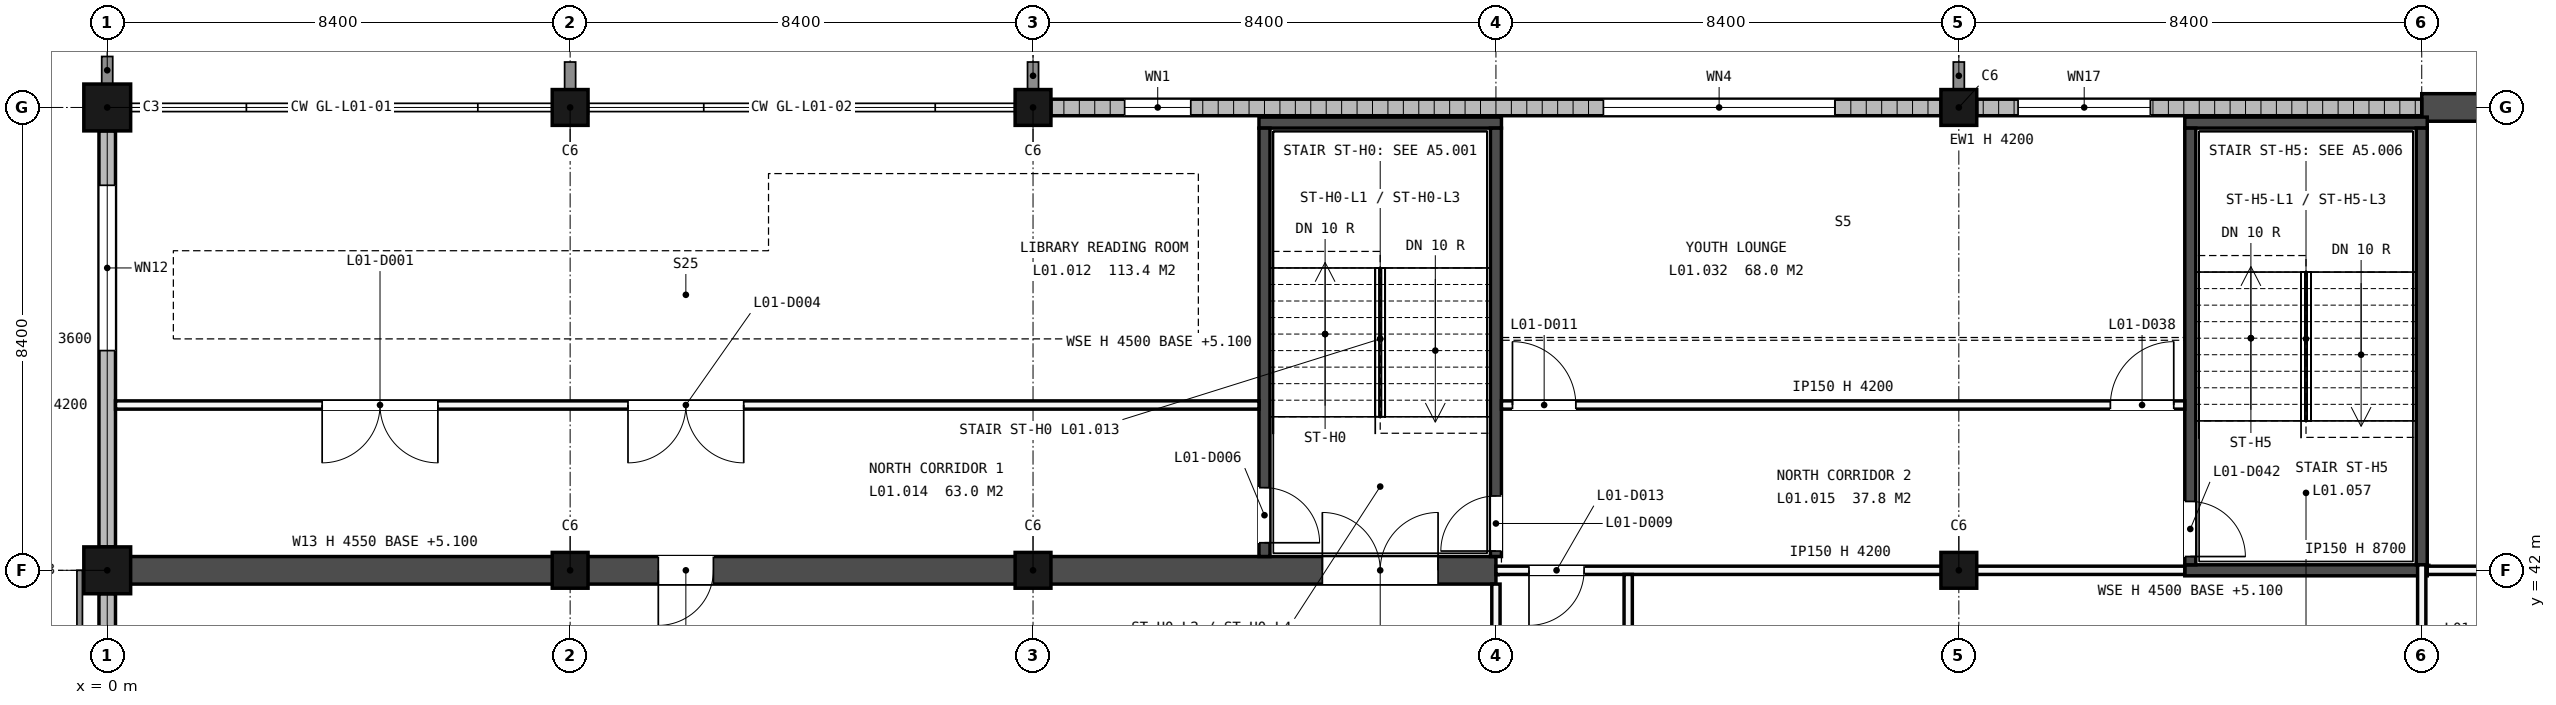
"""IFC4 building model, lengths in metres.
Left out: names, types, materials, properties, quantities, classifications, styles, units other than length and angle.
Written with IfcOpenShell. Run it as: python <this file> out.ifc"""

import sys

from ifc_helpers import new_model, si_unit, direction, frame, frame_2d, origin, origin_2d, place, context, subcontext, project, spatial, rectangle, extrude, element, fill, save


model = new_model("IFC4")
c1 = context("Model", 3, precision=1e-05, world=origin(), true_north=direction((0.0, 1.0)))
c2 = subcontext(c1, "Body", "Model", "MODEL_VIEW")
j1 = project(units=[si_unit("LENGTHUNIT", "METRE"), si_unit("PLANEANGLEUNIT", "RADIAN")], contexts=[c1])
p1 = place(None, origin())
s1 = spatial("IfcSite", under=j1, at=p1, CompositionType="ELEMENT")
p2 = place(p1, origin())
s2 = spatial("IfcBuilding", under=s1, at=p2, CompositionType="ELEMENT")
p3 = place(p2, frame((0.0, 0.0, 5.4)))
s3 = spatial("IfcBuildingStorey", under=s2, at=p3, CompositionType="ELEMENT", Elevation=5.4)
for number, where, z_axis, x_axis in (
    (1, (0.0, 42.0, -0.3), (0.0, 0.0, 1.0), (1.0, 0.0, 0.0)),
    (2, (0.0, 50.4, -0.3), (0.0, 0.0, 1.0), (1.0, 0.0, 0.0)),
):
    element("IfcColumn", number, at=place(p3, frame(where, z_axis=z_axis, x_axis=x_axis)), inside=s3, PredefinedType="COLUMN", context=c2, shape_type="SweptSolid", body=[
        extrude(rectangle(XDim=0.85, YDim=0.85, at=origin_2d()), origin(), (0.0, 0.0, 1.0), 4.55),
    ])
for number, where, z_axis, x_axis in (
    (3, (8.4, 42.0, -0.3), (0.0, 0.0, 1.0), (1.0, 0.0, 0.0)),
    (4, (8.4, 50.4, -0.3), (0.0, 0.0, 1.0), (1.0, 0.0, 0.0)),
    (5, (16.8, 42.0, -0.3), (0.0, 0.0, 1.0), (1.0, 0.0, 0.0)),
    (6, (16.8, 50.4, -0.3), (0.0, 0.0, 1.0), (1.0, 0.0, 0.0)),
    (7, (33.6, 42.0, -0.3), (0.0, 0.0, 1.0), (1.0, 0.0, 0.0)),
    (8, (33.6, 50.4, -0.3), (0.0, 0.0, 1.0), (1.0, 0.0, 0.0)),
):
    element("IfcColumn", number, at=place(p3, frame(where, z_axis=z_axis, x_axis=x_axis)), inside=s3, PredefinedType="COLUMN", context=c2, shape_type="SweptSolid", body=[
        extrude(rectangle(XDim=0.65, YDim=0.65, at=origin_2d()), origin(), (0.0, 0.0, 1.0), 4.55),
    ])
p4 = place(p3, frame((42.0, 50.4, -0.3), z_axis=(0.0, 0.0, 1.0), x_axis=(1.0, 0.0, 0.0)))
e9 = element("IfcWall", 9, at=p4, inside=s3, PredefinedType="SHEAR", context=c2, shape_type="SweptSolid", body=[
    extrude(rectangle(XDim=42.0, YDim=0.5, at=frame_2d((21.0, 0.0))), origin(), (0.0, 0.0, 1.0), 4.55),
])
p5 = place(p3, frame((0.0, 42.0, -0.3), z_axis=(0.0, 0.0, 1.0), x_axis=(1.0, 0.0, 0.0)))
e10 = element("IfcWall", 10, at=p5, inside=s3, PredefinedType="SHEAR", context=c2, shape_type="SweptSolid", body=[
    extrude(rectangle(XDim=25.2, YDim=0.5, at=frame_2d((12.6, 0.0))), origin(), (0.0, 0.0, 1.0), 4.55),
])
p6 = place(p5, frame((22.05, 0.0, 0.3)))
e11 = element("IfcOpeningElement", 11, at=p6, cuts=e10, PredefinedType="OPENING", context=c2, shape_type="SweptSolid", body=[
    extrude(rectangle(XDim=2.1, YDim=2.1, at=frame_2d((1.05, 1.05))), frame((0.0, 0.26, 0.0), z_axis=(0.0, -1.0, 0.0), x_axis=(1.0, 0.0, 0.0)), (0.0, 0.0, 1.0), 0.52),
])
p7 = place(p5, frame((10.0, 0.0, 0.3)))
e12 = element("IfcOpeningElement", 12, at=p7, cuts=e10, PredefinedType="OPENING", context=c2, shape_type="SweptSolid", body=[
    extrude(rectangle(XDim=1.0, YDim=2.1, at=frame_2d((0.5, 1.05))), frame((0.0, 0.26, 0.0), z_axis=(0.0, -1.0, 0.0), x_axis=(1.0, 0.0, 0.0)), (0.0, 0.0, 1.0), 0.52),
])
p8 = place(p3, frame((17.125, 50.4, 0.0), z_axis=(0.0, 0.0, 1.0), x_axis=(1.0, 0.0, 0.0)))
e13 = element("IfcWall", 13, at=p8, inside=s3, PredefinedType="STANDARD", context=c2, shape_type="SweptSolid", body=[
    extrude(rectangle(XDim=16.15, YDim=0.3, at=frame_2d((8.075, 0.0))), origin(), (0.0, 0.0, 1.0), 4.2),
])
p9 = place(p8, frame((1.337, 0.0, 0.9)))
e14 = element("IfcOpeningElement", 14, at=p9, cuts=e13, PredefinedType="OPENING", context=c2, shape_type="SweptSolid", body=[
    extrude(rectangle(XDim=1.2, YDim=1.5, at=frame_2d((0.6, 0.75))), frame((0.0, 0.16, 0.0), z_axis=(0.0, -1.0, 0.0), x_axis=(1.0, 0.0, 0.0)), (0.0, 0.0, 1.0), 0.32),
])
p10 = place(p8, frame((10.025, 0.0, 0.9)))
e15 = element("IfcOpeningElement", 15, at=p10, cuts=e13, PredefinedType="OPENING", context=c2, shape_type="SweptSolid", body=[
    extrude(rectangle(XDim=4.2, YDim=1.5, at=frame_2d((2.1, 0.75))), frame((0.0, 0.16, 0.0), z_axis=(0.0, -1.0, 0.0), x_axis=(1.0, 0.0, 0.0)), (0.0, 0.0, 1.0), 0.32),
])
p11 = place(p3, frame((33.925, 50.4, 0.0), z_axis=(0.0, 0.0, 1.0), x_axis=(1.0, 0.0, 0.0)))
e16 = element("IfcWall", 16, at=p11, inside=s3, PredefinedType="STANDARD", context=c2, shape_type="SweptSolid", body=[
    extrude(rectangle(XDim=8.075, YDim=0.3, at=frame_2d((4.038, 0.0))), origin(), (0.0, 0.0, 1.0), 4.2),
])
p12 = place(p11, frame((0.75, 0.0, 0.9)))
e17 = element("IfcOpeningElement", 17, at=p12, cuts=e16, PredefinedType="OPENING", context=c2, shape_type="SweptSolid", body=[
    extrude(rectangle(XDim=2.4, YDim=1.5, at=frame_2d((1.2, 0.75))), frame((0.0, 0.16, 0.0), z_axis=(0.0, -1.0, 0.0), x_axis=(1.0, 0.0, 0.0)), (0.0, 0.0, 1.0), 0.32),
])
p13 = place(p3, frame((0.0, 8.825, 0.0), z_axis=(0.0, 0.0, 1.0), x_axis=(0.0, 1.0, 0.0)))
e18 = element("IfcWall", 18, at=p13, inside=s3, PredefinedType="STANDARD", context=c2, shape_type="SweptSolid", body=[
    extrude(rectangle(XDim=32.75, YDim=0.3, at=frame_2d((16.375, 0.0))), origin(), (0.0, 0.0, 1.0), 3.4),
])
p14 = place(p13, frame((29.663, 0.0, 0.9)))
e19 = element("IfcOpeningElement", 19, at=p14, cuts=e18, PredefinedType="OPENING", context=c2, shape_type="SweptSolid", body=[
    extrude(rectangle(XDim=2.4, YDim=1.5, at=frame_2d((1.2, 0.75))), frame((0.0, 0.16, 0.0), z_axis=(0.0, -1.0, 0.0), x_axis=(1.0, 0.0, 0.0)), (0.0, 0.0, 1.0), 0.32),
])
p15 = place(p3, frame((0.0, 42.425, 0.0), z_axis=(0.0, 0.0, 1.0), x_axis=(0.0, 1.0, 0.0)))
e20 = element("IfcWall", 20, at=p15, inside=s3, PredefinedType="STANDARD", context=c2, shape_type="SweptSolid", body=[
    extrude(rectangle(XDim=7.55, YDim=0.3, at=frame_2d((3.775, 0.0))), origin(), (0.0, 0.0, 1.0), 3.6),
])
p16 = place(p15, frame((3.562, 0.0, 2.4)))
e21 = element("IfcOpeningElement", 21, at=p16, cuts=e20, PredefinedType="OPENING", context=c2, shape_type="SweptSolid", body=[
    extrude(rectangle(XDim=3.0, YDim=0.9, at=frame_2d((1.5, 0.45))), frame((0.0, 0.16, 0.0), z_axis=(0.0, -1.0, 0.0), x_axis=(1.0, 0.0, 0.0)), (0.0, 0.0, 1.0), 0.32),
])
p17 = place(p3, frame((20.9, 50.125, -0.3), z_axis=(0.0, 0.0, 1.0), x_axis=(1.0, 0.0, 0.0)))
e22 = element("IfcWall", 22, at=p17, inside=s3, PredefinedType="SHEAR", context=c2, shape_type="SweptSolid", body=[
    extrude(rectangle(XDim=4.4, YDim=0.2, at=frame_2d((2.2, 0.0))), origin(), (0.0, 0.0, 1.0), 4.5),
])
p18 = place(p3, frame((21.0, 42.25, -0.3), z_axis=(0.0, 0.0, 1.0), x_axis=(0.0, 1.0, 0.0)))
e23 = element("IfcWall", 23, at=p18, inside=s3, PredefinedType="SHEAR", context=c2, shape_type="SweptSolid", body=[
    extrude(rectangle(XDim=7.775, YDim=0.2, at=frame_2d((3.887, 0.0))), origin(), (0.0, 0.0, 1.0), 4.5),
])
p19 = place(p18, frame((0.25, 0.0, 0.3)))
e24 = element("IfcOpeningElement", 24, at=p19, cuts=e23, PredefinedType="OPENING", context=c2, shape_type="SweptSolid", body=[
    extrude(rectangle(XDim=1.0, YDim=2.1, at=frame_2d((0.5, 1.05))), frame((0.0, 0.11, 0.0), z_axis=(0.0, -1.0, 0.0), x_axis=(1.0, 0.0, 0.0)), (0.0, 0.0, 1.0), 0.22),
])
p20 = place(p3, frame((25.2, 42.25, -0.3), z_axis=(0.0, 0.0, 1.0), x_axis=(0.0, 1.0, 0.0)))
e25 = element("IfcWall", 25, at=p20, inside=s3, PredefinedType="SHEAR", context=c2, shape_type="SweptSolid", body=[
    extrude(rectangle(XDim=7.775, YDim=0.2, at=frame_2d((3.887, 0.0))), origin(), (0.0, 0.0, 1.0), 4.5),
])
p21 = place(p20, frame((0.1, 0.0, 0.3)))
e26 = element("IfcOpeningElement", 26, at=p21, cuts=e25, PredefinedType="OPENING", context=c2, shape_type="SweptSolid", body=[
    extrude(rectangle(XDim=1.0, YDim=2.1, at=frame_2d((0.5, 1.05))), frame((0.0, 0.11, 0.0), z_axis=(0.0, -1.0, 0.0), x_axis=(1.0, 0.0, 0.0)), (0.0, 0.0, 1.0), 0.22),
])
for number, where, z_axis, x_axis in (
    (27, (37.7, 42.0, -0.3), (0.0, 0.0, 1.0), (1.0, 0.0, 0.0)),
    (28, (37.7, 50.125, -0.3), (0.0, 0.0, 1.0), (1.0, 0.0, 0.0)),
):
    element("IfcWall", number, at=place(p3, frame(where, z_axis=z_axis, x_axis=x_axis)), inside=s3, PredefinedType="SHEAR", context=c2, shape_type="SweptSolid", body=[
        extrude(rectangle(XDim=4.4, YDim=0.2, at=frame_2d((2.2, 0.0))), origin(), (0.0, 0.0, 1.0), 4.5),
    ])
p22 = place(p3, frame((37.8, 42.1, -0.3), z_axis=(0.0, 0.0, 1.0), x_axis=(0.0, 1.0, 0.0)))
e29 = element("IfcWall", 29, at=p22, inside=s3, PredefinedType="SHEAR", context=c2, shape_type="SweptSolid", body=[
    extrude(rectangle(XDim=7.925, YDim=0.2, at=frame_2d((3.962, 0.0))), origin(), (0.0, 0.0, 1.0), 4.5),
])
p23 = place(p22, frame((0.15, 0.0, 0.3)))
e30 = element("IfcOpeningElement", 30, at=p23, cuts=e29, PredefinedType="OPENING", context=c2, shape_type="SweptSolid", body=[
    extrude(rectangle(XDim=1.0, YDim=2.1, at=frame_2d((0.5, 1.05))), frame((0.0, 0.11, 0.0), z_axis=(0.0, -1.0, 0.0), x_axis=(1.0, 0.0, 0.0)), (0.0, 0.0, 1.0), 0.22),
])
p24 = place(p3, frame((42.0, 42.1, -0.3), z_axis=(0.0, 0.0, 1.0), x_axis=(0.0, 1.0, 0.0)))
e31 = element("IfcWall", 31, at=p24, inside=s3, PredefinedType="SHEAR", context=c2, shape_type="SweptSolid", body=[
    extrude(rectangle(XDim=7.925, YDim=0.2, at=frame_2d((3.962, 0.0))), origin(), (0.0, 0.0, 1.0), 4.5),
])
p25 = place(p3, frame((42.1, 42.0, -0.3), z_axis=(0.0, 0.0, 1.0), x_axis=(1.0, 0.0, 0.0)))
e32 = element("IfcWall", 32, at=p25, inside=s3, PredefinedType="PARTITIONING", context=c2, shape_type="SweptSolid", body=[
    extrude(rectangle(XDim=41.9, YDim=0.15, at=frame_2d((20.95, 0.0))), origin(), (0.0, 0.0, 1.0), 4.5),
])
p26 = place(p3, frame((25.2, 42.0, 0.0), z_axis=(0.0, 0.0, 1.0), x_axis=(1.0, 0.0, 0.0)))
e33 = element("IfcWall", 33, at=p26, inside=s3, PredefinedType="PARTITIONING", context=c2, shape_type="SweptSolid", body=[
    extrude(rectangle(XDim=12.5, YDim=0.15, at=frame_2d((6.25, 0.0))), origin(), (0.0, 0.0, 1.0), 4.2),
])
p27 = place(p26, frame((0.6, 0.0, 0.0)))
e34 = element("IfcOpeningElement", 34, at=p27, cuts=e33, PredefinedType="OPENING", context=c2, shape_type="SweptSolid", body=[
    extrude(rectangle(XDim=1.0, YDim=2.1, at=frame_2d((0.5, 1.05))), frame((0.0, 0.085, 0.0), z_axis=(0.0, -1.0, 0.0), x_axis=(1.0, 0.0, 0.0)), (0.0, 0.0, 1.0), 0.17),
])
p28 = place(p3, frame((0.15, 45.0, 0.0), z_axis=(0.0, 0.0, 1.0), x_axis=(1.0, 0.0, 0.0)))
e35 = element("IfcWall", 35, at=p28, inside=s3, PredefinedType="PARTITIONING", context=c2, shape_type="SweptSolid", body=[
    extrude(rectangle(XDim=20.75, YDim=0.15, at=frame_2d((10.375, 0.0))), origin(), (0.0, 0.0, 1.0), 4.2),
])
p29 = place(p28, frame((9.3, 0.0, 0.0)))
e36 = element("IfcOpeningElement", 36, at=p29, cuts=e35, PredefinedType="OPENING", context=c2, shape_type="SweptSolid", body=[
    extrude(rectangle(XDim=2.1, YDim=2.25, at=frame_2d((1.05, 1.125))), frame((0.0, 0.085, 0.0), z_axis=(0.0, -1.0, 0.0), x_axis=(1.0, 0.0, 0.0)), (0.0, 0.0, 1.0), 0.17),
])
p30 = place(p28, frame((3.75, 0.0, 0.0)))
e37 = element("IfcOpeningElement", 37, at=p30, cuts=e35, PredefinedType="OPENING", context=c2, shape_type="SweptSolid", body=[
    extrude(rectangle(XDim=2.1, YDim=2.25, at=frame_2d((1.05, 1.125))), frame((0.0, 0.085, 0.0), z_axis=(0.0, -1.0, 0.0), x_axis=(1.0, 0.0, 0.0)), (0.0, 0.0, 1.0), 0.17),
])
p31 = place(p3, frame((25.3, 45.0, 0.0), z_axis=(0.0, 0.0, 1.0), x_axis=(1.0, 0.0, 0.0)))
e38 = element("IfcWall", 38, at=p31, inside=s3, PredefinedType="PARTITIONING", context=c2, shape_type="SweptSolid", body=[
    extrude(rectangle(XDim=12.4, YDim=0.15, at=frame_2d((6.2, 0.0))), origin(), (0.0, 0.0, 1.0), 4.2),
])
p32 = place(p31, frame((0.2, 0.0, 0.0)))
e39 = element("IfcOpeningElement", 39, at=p32, cuts=e38, PredefinedType="OPENING", context=c2, shape_type="SweptSolid", body=[
    extrude(rectangle(XDim=1.15, YDim=2.1, at=frame_2d((0.575, 1.05))), frame((0.0, 0.085, 0.0), z_axis=(0.0, -1.0, 0.0), x_axis=(1.0, 0.0, 0.0)), (0.0, 0.0, 1.0), 0.17),
])
p33 = place(p31, frame((11.05, 0.0, 0.0)))
e40 = element("IfcOpeningElement", 40, at=p33, cuts=e38, PredefinedType="OPENING", context=c2, shape_type="SweptSolid", body=[
    extrude(rectangle(XDim=1.15, YDim=2.1, at=frame_2d((0.575, 1.05))), frame((0.0, 0.085, 0.0), z_axis=(0.0, -1.0, 0.0), x_axis=(1.0, 0.0, 0.0)), (0.0, 0.0, 1.0), 0.17),
])
p34 = place(p3, frame((25.2, 37.8, 0.0), z_axis=(0.0, 0.0, 1.0), x_axis=(0.0, 1.0, 0.0)))
e41 = element("IfcWall", 41, at=p34, inside=s3, PredefinedType="PARTITIONING", context=c2, shape_type="SweptSolid", body=[
    extrude(rectangle(XDim=3.95, YDim=0.15, at=frame_2d((1.975, 0.0))), origin(), (0.0, 0.0, 1.0), 3.6),
])
p35 = place(p34, frame((1.4, 0.0, 0.0)))
e42 = element("IfcOpeningElement", 42, at=p35, cuts=e41, PredefinedType="OPENING", context=c2, shape_type="SweptSolid", body=[
    extrude(rectangle(XDim=1.0, YDim=2.1, at=frame_2d((0.5, 1.05))), frame((0.0, 0.085, 0.0), z_axis=(0.0, -1.0, 0.0), x_axis=(1.0, 0.0, 0.0)), (0.0, 0.0, 1.0), 0.17),
])
p36 = place(p3, frame((27.6, 33.5, 0.0), z_axis=(0.0, 0.0, 1.0), x_axis=(0.0, 1.0, 0.0)))
e43 = element("IfcWall", 43, at=p36, inside=s3, PredefinedType="PARTITIONING", context=c2, shape_type="SweptSolid", body=[
    extrude(rectangle(XDim=8.425, YDim=0.15, at=frame_2d((4.212, 0.0))), origin(), (0.0, 0.0, 1.0), 4.2),
])
p37 = place(p3, frame((42.0, 37.8, 0.0), z_axis=(0.0, 0.0, 1.0), x_axis=(0.0, 1.0, 0.0)))
e44 = element("IfcWall", 44, at=p37, inside=s3, PredefinedType="PARTITIONING", context=c2, shape_type="SweptSolid", body=[
    extrude(rectangle(XDim=4.3, YDim=0.15, at=frame_2d((2.15, 0.0))), origin(), (0.0, 0.0, 1.0), 8.7),
])
p38 = place(p37, frame((1.6, 0.0, 0.0)))
e45 = element("IfcOpeningElement", 45, at=p38, cuts=e44, PredefinedType="OPENING", context=c2, shape_type="SweptSolid", body=[
    extrude(rectangle(XDim=1.0, YDim=2.1, at=frame_2d((0.5, 1.05))), frame((0.0, 0.085, 0.0), z_axis=(0.0, -1.0, 0.0), x_axis=(1.0, 0.0, 0.0)), (0.0, 0.0, 1.0), 0.17),
])
p39 = place(p9, origin())
e46 = element("IfcWindow", 46, at=p39, inside=s3, PartitioningType="SINGLE_PANEL", PredefinedType="WINDOW", context=c2, shape_type="SweptSolid", body=[
    extrude(rectangle(XDim=1.2, YDim=1.5, at=frame_2d((0.6, 0.75))), frame((0.0, 0.03, 0.0), z_axis=(0.0, -1.0, 0.0), x_axis=(1.0, 0.0, 0.0)), (0.0, 0.0, 1.0), 0.06),
])
fill(e14, e46)
p40 = place(p10, origin())
e47 = element("IfcWindow", 47, at=p40, inside=s3, PartitioningType="SINGLE_PANEL", PredefinedType="WINDOW", context=c2, shape_type="SweptSolid", body=[
    extrude(rectangle(XDim=4.2, YDim=1.5, at=frame_2d((2.1, 0.75))), frame((0.0, 0.03, 0.0), z_axis=(0.0, -1.0, 0.0), x_axis=(1.0, 0.0, 0.0)), (0.0, 0.0, 1.0), 0.06),
])
fill(e15, e47)
p41 = place(p12, origin())
e48 = element("IfcWindow", 48, at=p41, inside=s3, PartitioningType="SINGLE_PANEL", PredefinedType="WINDOW", context=c2, shape_type="SweptSolid", body=[
    extrude(rectangle(XDim=2.4, YDim=1.5, at=frame_2d((1.2, 0.75))), frame((0.0, 0.03, 0.0), z_axis=(0.0, -1.0, 0.0), x_axis=(1.0, 0.0, 0.0)), (0.0, 0.0, 1.0), 0.06),
])
fill(e17, e48)
p42 = place(p16, origin())
e49 = element("IfcWindow", 49, at=p42, inside=s3, PartitioningType="SINGLE_PANEL", PredefinedType="WINDOW", context=c2, shape_type="SweptSolid", body=[
    extrude(rectangle(XDim=3.0, YDim=0.9, at=frame_2d((1.5, 0.45))), frame((0.0, 0.03, 0.0), z_axis=(0.0, -1.0, 0.0), x_axis=(1.0, 0.0, 0.0)), (0.0, 0.0, 1.0), 0.06),
])
fill(e21, e49)
p43 = place(p6, origin())
e50 = element("IfcDoor", 50, at=p43, inside=s3, OperationType="DOUBLE_DOOR_SINGLE_SWING", PredefinedType="DOOR", context=c2, shape_type="SweptSolid", body=[
    extrude(rectangle(XDim=2.1, YDim=2.1, at=frame_2d((1.05, 1.05))), frame((0.0, 0.025, 0.0), z_axis=(0.0, -1.0, 0.0), x_axis=(1.0, 0.0, 0.0)), (0.0, 0.0, 1.0), 0.05),
])
fill(e11, e50)
p44 = place(p21, origin())
e51 = element("IfcDoor", 51, at=p44, inside=s3, OperationType="SINGLE_SWING_RIGHT", PredefinedType="DOOR", context=c2, shape_type="SweptSolid", body=[
    extrude(rectangle(XDim=1.0, YDim=2.1, at=frame_2d((0.5, 1.05))), frame((0.0, 0.025, 0.0), z_axis=(0.0, -1.0, 0.0), x_axis=(1.0, 0.0, 0.0)), (0.0, 0.0, 1.0), 0.05),
])
fill(e26, e51)
p45 = place(p23, origin())
e52 = element("IfcDoor", 52, at=p45, inside=s3, OperationType="SINGLE_SWING_LEFT", PredefinedType="DOOR", context=c2, shape_type="SweptSolid", body=[
    extrude(rectangle(XDim=1.0, YDim=2.1, at=frame_2d((0.5, 1.05))), frame((0.0, 0.025, 0.0), z_axis=(0.0, -1.0, 0.0), x_axis=(1.0, 0.0, 0.0)), (0.0, 0.0, 1.0), 0.05),
])
fill(e30, e52)
p46 = place(p29, origin())
e53 = element("IfcDoor", 53, at=p46, inside=s3, OperationType="DOUBLE_DOOR_SINGLE_SWING", PredefinedType="DOOR", context=c2, shape_type="SweptSolid", body=[
    extrude(rectangle(XDim=2.1, YDim=2.25, at=frame_2d((1.05, 1.125))), frame((0.0, 0.025, 0.0), z_axis=(0.0, -1.0, 0.0), x_axis=(1.0, 0.0, 0.0)), (0.0, 0.0, 1.0), 0.05),
])
fill(e36, e53)
p47 = place(p30, origin())
e54 = element("IfcDoor", 54, at=p47, inside=s3, OperationType="DOUBLE_DOOR_SINGLE_SWING", PredefinedType="DOOR", context=c2, shape_type="SweptSolid", body=[
    extrude(rectangle(XDim=2.1, YDim=2.25, at=frame_2d((1.05, 1.125))), frame((0.0, 0.025, 0.0), z_axis=(0.0, -1.0, 0.0), x_axis=(1.0, 0.0, 0.0)), (0.0, 0.0, 1.0), 0.05),
])
fill(e37, e54)
p48 = place(p32, origin())
e55 = element("IfcDoor", 55, at=p48, inside=s3, OperationType="SINGLE_SWING_RIGHT", PredefinedType="DOOR", context=c2, shape_type="SweptSolid", body=[
    extrude(rectangle(XDim=1.15, YDim=2.1, at=frame_2d((0.575, 1.05))), frame((0.0, 0.025, 0.0), z_axis=(0.0, -1.0, 0.0), x_axis=(1.0, 0.0, 0.0)), (0.0, 0.0, 1.0), 0.05),
])
fill(e39, e55)
p49 = place(p33, origin())
e56 = element("IfcDoor", 56, at=p49, inside=s3, OperationType="SINGLE_SWING_LEFT", PredefinedType="DOOR", context=c2, shape_type="SweptSolid", body=[
    extrude(rectangle(XDim=1.15, YDim=2.1, at=frame_2d((0.575, 1.05))), frame((0.0, 0.025, 0.0), z_axis=(0.0, -1.0, 0.0), x_axis=(1.0, 0.0, 0.0)), (0.0, 0.0, 1.0), 0.05),
])
fill(e40, e56)
p50 = place(p7, origin())
e57 = element("IfcDoor", 57, at=p50, inside=s3, OperationType="SINGLE_SWING_LEFT", PredefinedType="DOOR", context=c2, shape_type="SweptSolid", body=[
    extrude(rectangle(XDim=1.0, YDim=2.1, at=frame_2d((0.5, 1.05))), frame((0.0, 0.025, 0.0), z_axis=(0.0, -1.0, 0.0), x_axis=(1.0, 0.0, 0.0)), (0.0, 0.0, 1.0), 0.05),
])
fill(e12, e57)
p51 = place(p19, origin())
e58 = element("IfcDoor", 58, at=p51, inside=s3, OperationType="SINGLE_SWING_LEFT", PredefinedType="DOOR", context=c2, shape_type="SweptSolid", body=[
    extrude(rectangle(XDim=1.0, YDim=2.1, at=frame_2d((0.5, 1.05))), frame((0.0, 0.025, 0.0), z_axis=(0.0, -1.0, 0.0), x_axis=(1.0, 0.0, 0.0)), (0.0, 0.0, 1.0), 0.05),
])
fill(e24, e58)
p52 = place(p27, origin())
e59 = element("IfcDoor", 59, at=p52, inside=s3, OperationType="SINGLE_SWING_LEFT", PredefinedType="DOOR", context=c2, shape_type="SweptSolid", body=[
    extrude(rectangle(XDim=1.0, YDim=2.1, at=frame_2d((0.5, 1.05))), frame((0.0, 0.025, 0.0), z_axis=(0.0, -1.0, 0.0), x_axis=(1.0, 0.0, 0.0)), (0.0, 0.0, 1.0), 0.05),
])
fill(e34, e59)
save(model, sys.argv[1])
